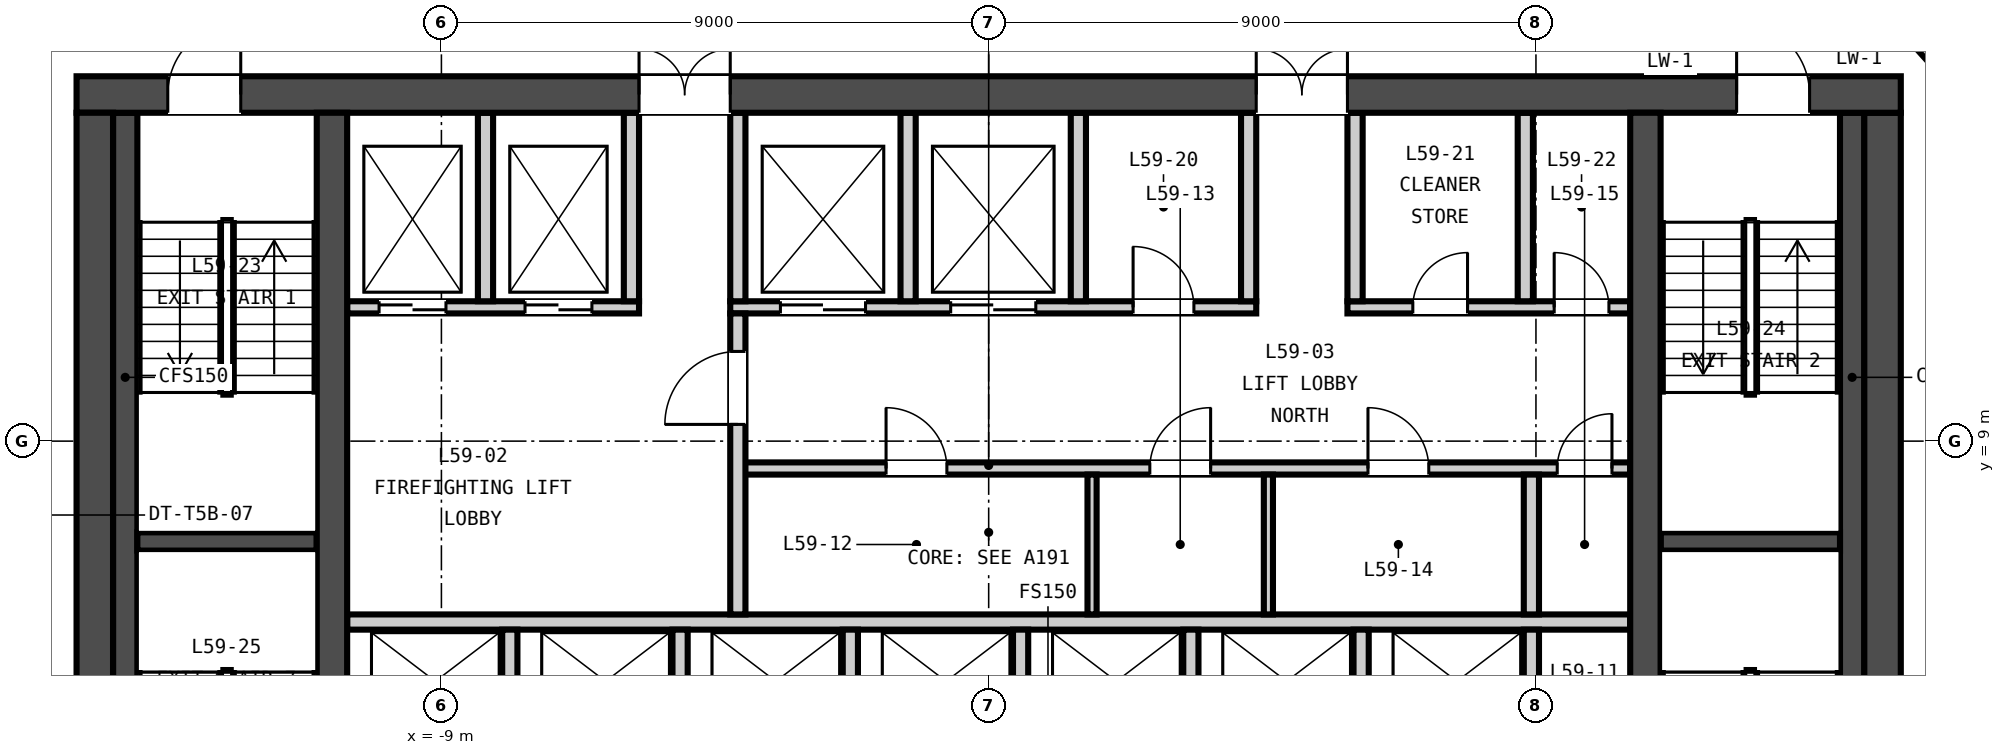
"""IFC4 building model, lengths in metres.
Left out: names, types, materials, properties, quantities, classifications, styles, units other than length and angle.
Written with IfcOpenShell. Run it as: python <this file> out.ifc"""

import sys

from ifc_helpers import new_model, si_unit, direction, frame, frame_2d, origin, place, context, subcontext, project, spatial, rectangle, extrude, element, fill, save


model = new_model("IFC4")
c1 = context("Model", 3, precision=1e-05, world=origin(), true_north=direction((0.0, 1.0)))
c2 = subcontext(c1, "Body", "Model", "MODEL_VIEW")
j1 = project(units=[si_unit("LENGTHUNIT", "METRE"), si_unit("PLANEANGLEUNIT", "RADIAN")], contexts=[c1])
p1 = place(None, origin())
s1 = spatial("IfcSite", under=j1, at=p1, CompositionType="ELEMENT")
p2 = place(p1, origin())
s2 = spatial("IfcBuilding", under=s1, at=p2, CompositionType="ELEMENT")
p3 = place(p2, frame((0.0, 0.0, 234.55)))
s3 = spatial("IfcBuildingStorey", under=s2, at=p3, CompositionType="ELEMENT", Elevation=234.55)
p4 = place(p3, frame((-15.0, 14.7, -0.15), z_axis=(0.0, 0.0, 1.0), x_axis=(1.0, 0.0, 0.0)))
e1 = element("IfcWall", 1, at=p4, inside=s3, PredefinedType="SOLIDWALL", context=c2, shape_type="SweptSolid", body=[
    extrude(rectangle(XDim=30.0, YDim=0.6, at=frame_2d((15.0, 0.0))), origin(), (0.0, 0.0, 1.0), 3.65),
])
p5 = place(p4, frame((9.25, 0.0, 0.15)))
e2 = element("IfcOpeningElement", 2, at=p5, cuts=e1, PredefinedType="OPENING", context=c2, shape_type="SweptSolid", body=[
    extrude(rectangle(XDim=1.5, YDim=2.1, at=frame_2d((0.75, 1.05))), frame((0.0, 0.31, 0.0), z_axis=(0.0, -1.0, 0.0), x_axis=(1.0, 0.0, 0.0)), (0.0, 0.0, 1.0), 0.62),
])
p6 = place(p4, frame((19.4, 0.0, 0.15)))
e3 = element("IfcOpeningElement", 3, at=p6, cuts=e1, PredefinedType="OPENING", context=c2, shape_type="SweptSolid", body=[
    extrude(rectangle(XDim=1.5, YDim=2.1, at=frame_2d((0.75, 1.05))), frame((0.0, 0.31, 0.0), z_axis=(0.0, -1.0, 0.0), x_axis=(1.0, 0.0, 0.0)), (0.0, 0.0, 1.0), 0.62),
])
p7 = place(p4, frame((1.5, 0.0, 0.15)))
e4 = element("IfcOpeningElement", 4, at=p7, cuts=e1, PredefinedType="OPENING", context=c2, shape_type="SweptSolid", body=[
    extrude(rectangle(XDim=1.2, YDim=2.1, at=frame_2d((0.6, 1.05))), frame((0.0, 0.31, 0.0), z_axis=(0.0, -1.0, 0.0), x_axis=(1.0, 0.0, 0.0)), (0.0, 0.0, 1.0), 0.62),
])
p8 = place(p4, frame((27.3, 0.0, 0.15)))
e5 = element("IfcOpeningElement", 5, at=p8, cuts=e1, PredefinedType="OPENING", context=c2, shape_type="SweptSolid", body=[
    extrude(rectangle(XDim=1.2, YDim=2.1, at=frame_2d((0.6, 1.05))), frame((0.0, 0.31, 0.0), z_axis=(0.0, -1.0, 0.0), x_axis=(1.0, 0.0, 0.0)), (0.0, 0.0, 1.0), 0.62),
])
for number, where, z_axis, x_axis in (
    (6, (-14.7, 0.6, -0.15), (0.0, 0.0, 1.0), (0.0, 1.0, 0.0)),
    (7, (14.7, 0.6, -0.15), (0.0, 0.0, 1.0), (0.0, 1.0, 0.0)),
):
    element("IfcWall", number, at=place(p3, frame(where, z_axis=z_axis, x_axis=x_axis)), inside=s3, PredefinedType="SOLIDWALL", context=c2, shape_type="SweptSolid", body=[
        extrude(rectangle(XDim=13.8, YDim=0.6, at=frame_2d((6.9, 0.0))), origin(), (0.0, 0.0, 1.0), 3.65),
    ])
for number, where, z_axis, x_axis in (
    (8, (-10.8, 0.6, -0.15), (0.0, 0.0, 1.0), (0.0, 1.0, 0.0)),
    (9, (10.8, 0.6, -0.15), (0.0, 0.0, 1.0), (0.0, 1.0, 0.0)),
):
    element("IfcWall", number, at=place(p3, frame(where, z_axis=z_axis, x_axis=x_axis)), inside=s3, PredefinedType="SOLIDWALL", context=c2, shape_type="SweptSolid", body=[
        extrude(rectangle(XDim=13.8, YDim=0.5, at=frame_2d((6.9, 0.0))), origin(), (0.0, 0.0, 1.0), 3.65),
    ])
p9 = place(p3, frame((-10.55, 6.025, 0.0), z_axis=(0.0, 0.0, 1.0), x_axis=(1.0, 0.0, 0.0)))
e10 = element("IfcWall", 10, at=p9, inside=s3, PredefinedType="PARTITIONING", context=c2, shape_type="SweptSolid", body=[
    extrude(rectangle(XDim=21.1, YDim=0.25, at=frame_2d((10.55, 0.0))), origin(), (0.0, 0.0, 1.0), 3.5),
])
p10 = place(p3, frame((-4.125, 8.55, 0.0), z_axis=(0.0, 0.0, 1.0), x_axis=(1.0, 0.0, 0.0)))
e11 = element("IfcWall", 11, at=p10, inside=s3, PredefinedType="PARTITIONING", context=c2, shape_type="SweptSolid", body=[
    extrude(rectangle(XDim=14.675, YDim=0.2, at=frame_2d((7.337, 0.0))), origin(), (0.0, 0.0, 1.0), 3.5),
])
p11 = place(p10, frame((2.438, 0.0, 0.0)))
e12 = element("IfcOpeningElement", 12, at=p11, cuts=e11, PredefinedType="OPENING", context=c2, shape_type="SweptSolid", body=[
    extrude(rectangle(XDim=1.0, YDim=2.1, at=frame_2d((0.5, 1.05))), frame((0.0, 0.11, 0.0), z_axis=(0.0, -1.0, 0.0), x_axis=(1.0, 0.0, 0.0)), (0.0, 0.0, 1.0), 0.22),
])
p12 = place(p10, frame((6.775, 0.0, 0.0)))
e13 = element("IfcOpeningElement", 13, at=p12, cuts=e11, PredefinedType="OPENING", context=c2, shape_type="SweptSolid", body=[
    extrude(rectangle(XDim=1.0, YDim=2.1, at=frame_2d((0.5, 1.05))), frame((0.0, 0.11, 0.0), z_axis=(0.0, -1.0, 0.0), x_axis=(1.0, 0.0, 0.0)), (0.0, 0.0, 1.0), 0.22),
])
p13 = place(p10, frame((10.363, 0.0, 0.0)))
e14 = element("IfcOpeningElement", 14, at=p13, cuts=e11, PredefinedType="OPENING", context=c2, shape_type="SweptSolid", body=[
    extrude(rectangle(XDim=1.0, YDim=2.1, at=frame_2d((0.5, 1.05))), frame((0.0, 0.11, 0.0), z_axis=(0.0, -1.0, 0.0), x_axis=(1.0, 0.0, 0.0)), (0.0, 0.0, 1.0), 0.22),
])
p14 = place(p10, frame((13.475, 0.0, 0.0)))
e15 = element("IfcOpeningElement", 15, at=p14, cuts=e11, PredefinedType="OPENING", context=c2, shape_type="SweptSolid", body=[
    extrude(rectangle(XDim=0.9, YDim=2.1, at=frame_2d((0.45, 1.05))), frame((0.0, 0.11, 0.0), z_axis=(0.0, -1.0, 0.0), x_axis=(1.0, 0.0, 0.0)), (0.0, 0.0, 1.0), 0.22),
])
p15 = place(p3, frame((-10.55, 11.2, 0.0), z_axis=(0.0, 0.0, 1.0), x_axis=(1.0, 0.0, 0.0)))
e16 = element("IfcWall", 16, at=p15, inside=s3, PredefinedType="PARTITIONING", context=c2, shape_type="SweptSolid", body=[
    extrude(rectangle(XDim=4.8, YDim=0.2, at=frame_2d((2.4, 0.0))), origin(), (0.0, 0.0, 1.0), 3.5),
])
p16 = place(p15, frame((0.525, 0.0, 0.0)))
e17 = element("IfcOpeningElement", 17, at=p16, cuts=e16, PredefinedType="OPENING", context=c2, shape_type="SweptSolid", body=[
    extrude(rectangle(XDim=1.1, YDim=2.1, at=frame_2d((0.55, 1.05))), frame((0.0, 0.11, 0.0), z_axis=(0.0, -1.0, 0.0), x_axis=(1.0, 0.0, 0.0)), (0.0, 0.0, 1.0), 0.22),
])
p17 = place(p15, frame((2.925, 0.0, 0.0)))
e18 = element("IfcOpeningElement", 18, at=p17, cuts=e16, PredefinedType="OPENING", context=c2, shape_type="SweptSolid", body=[
    extrude(rectangle(XDim=1.1, YDim=2.1, at=frame_2d((0.55, 1.05))), frame((0.0, 0.11, 0.0), z_axis=(0.0, -1.0, 0.0), x_axis=(1.0, 0.0, 0.0)), (0.0, 0.0, 1.0), 0.22),
])
p18 = place(p3, frame((-4.25, 11.2, 0.0), z_axis=(0.0, 0.0, 1.0), x_axis=(1.0, 0.0, 0.0)))
e19 = element("IfcWall", 19, at=p18, inside=s3, PredefinedType="PARTITIONING", context=c2, shape_type="SweptSolid", body=[
    extrude(rectangle(XDim=8.65, YDim=0.2, at=frame_2d((4.325, 0.0))), origin(), (0.0, 0.0, 1.0), 3.5),
])
p19 = place(p18, frame((0.825, 0.0, 0.0)))
e20 = element("IfcOpeningElement", 20, at=p19, cuts=e19, PredefinedType="OPENING", context=c2, shape_type="SweptSolid", body=[
    extrude(rectangle(XDim=1.4, YDim=2.1, at=frame_2d((0.7, 1.05))), frame((0.0, 0.11, 0.0), z_axis=(0.0, -1.0, 0.0), x_axis=(1.0, 0.0, 0.0)), (0.0, 0.0, 1.0), 0.22),
])
p20 = place(p18, frame((3.625, 0.0, 0.0)))
e21 = element("IfcOpeningElement", 21, at=p20, cuts=e19, PredefinedType="OPENING", context=c2, shape_type="SweptSolid", body=[
    extrude(rectangle(XDim=1.4, YDim=2.1, at=frame_2d((0.7, 1.05))), frame((0.0, 0.11, 0.0), z_axis=(0.0, -1.0, 0.0), x_axis=(1.0, 0.0, 0.0)), (0.0, 0.0, 1.0), 0.22),
])
p21 = place(p18, frame((6.625, 0.0, 0.0)))
e22 = element("IfcOpeningElement", 22, at=p21, cuts=e19, PredefinedType="OPENING", context=c2, shape_type="SweptSolid", body=[
    extrude(rectangle(XDim=1.0, YDim=2.1, at=frame_2d((0.5, 1.05))), frame((0.0, 0.11, 0.0), z_axis=(0.0, -1.0, 0.0), x_axis=(1.0, 0.0, 0.0)), (0.0, 0.0, 1.0), 0.22),
])
p22 = place(p3, frame((5.9, 11.2, 0.0), z_axis=(0.0, 0.0, 1.0), x_axis=(1.0, 0.0, 0.0)))
e23 = element("IfcWall", 23, at=p22, inside=s3, PredefinedType="PARTITIONING", context=c2, shape_type="SweptSolid", body=[
    extrude(rectangle(XDim=4.65, YDim=0.2, at=frame_2d((2.325, 0.0))), origin(), (0.0, 0.0, 1.0), 3.5),
])
p23 = place(p22, frame((1.075, 0.0, 0.0)))
e24 = element("IfcOpeningElement", 24, at=p23, cuts=e23, PredefinedType="OPENING", context=c2, shape_type="SweptSolid", body=[
    extrude(rectangle(XDim=0.9, YDim=2.1, at=frame_2d((0.45, 1.05))), frame((0.0, 0.11, 0.0), z_axis=(0.0, -1.0, 0.0), x_axis=(1.0, 0.0, 0.0)), (0.0, 0.0, 1.0), 0.22),
])
p24 = place(p22, frame((3.4, 0.0, 0.0)))
e25 = element("IfcOpeningElement", 25, at=p24, cuts=e23, PredefinedType="OPENING", context=c2, shape_type="SweptSolid", body=[
    extrude(rectangle(XDim=0.9, YDim=2.1, at=frame_2d((0.45, 1.05))), frame((0.0, 0.11, 0.0), z_axis=(0.0, -1.0, 0.0), x_axis=(1.0, 0.0, 0.0)), (0.0, 0.0, 1.0), 0.22),
])
p25 = place(p3, frame((-4.125, 6.15, 0.0), z_axis=(0.0, 0.0, 1.0), x_axis=(0.0, 1.0, 0.0)))
e26 = element("IfcWall", 26, at=p25, inside=s3, PredefinedType="PARTITIONING", context=c2, shape_type="SweptSolid", body=[
    extrude(rectangle(XDim=4.95, YDim=0.25, at=frame_2d((2.475, 0.0))), origin(), (0.0, 0.0, 1.0), 3.5),
])
p26 = place(p25, frame((3.125, 0.0, 0.0)))
e27 = element("IfcOpeningElement", 27, at=p26, cuts=e26, PredefinedType="OPENING", context=c2, shape_type="SweptSolid", body=[
    extrude(rectangle(XDim=1.2, YDim=2.1, at=frame_2d((0.6, 1.05))), frame((0.0, 0.135, 0.0), z_axis=(0.0, -1.0, 0.0), x_axis=(1.0, 0.0, 0.0)), (0.0, 0.0, 1.0), 0.27),
])
for number, where, z_axis, x_axis in (
    (28, (-7.875, 3.6, 0.0), (0.0, 0.0, 1.0), (0.0, 1.0, 0.0)),
    (29, (-5.075, 3.6, 0.0), (0.0, 0.0, 1.0), (0.0, 1.0, 0.0)),
    (30, (-2.275, 3.6, 0.0), (0.0, 0.0, 1.0), (0.0, 1.0, 0.0)),
    (31, (0.525, 3.6, 0.0), (0.0, 0.0, 1.0), (0.0, 1.0, 0.0)),
    (32, (3.325, 3.6, 0.0), (0.0, 0.0, 1.0), (0.0, 1.0, 0.0)),
    (33, (6.125, 3.6, 0.0), (0.0, 0.0, 1.0), (0.0, 1.0, 0.0)),
    (34, (8.925, 3.6, 0.0), (0.0, 0.0, 1.0), (0.0, 1.0, 0.0)),
):
    element("IfcWall", number, at=place(p3, frame(where, z_axis=z_axis, x_axis=x_axis)), inside=s3, PredefinedType="PARTITIONING", context=c2, shape_type="SweptSolid", body=[
        extrude(rectangle(XDim=2.3, YDim=0.25, at=frame_2d((1.15, 0.0))), origin(), (0.0, 0.0, 1.0), 3.5),
    ])
for number, where, z_axis, x_axis in (
    (35, (1.7, 6.15, 0.0), (0.0, 0.0, 1.0), (0.0, 1.0, 0.0)),
    (36, (4.6, 6.15, 0.0), (0.0, 0.0, 1.0), (0.0, 1.0, 0.0)),
):
    element("IfcWall", number, at=place(p3, frame(where, z_axis=z_axis, x_axis=x_axis)), inside=s3, PredefinedType="PARTITIONING", context=c2, shape_type="SweptSolid", body=[
        extrude(rectangle(XDim=2.3, YDim=0.15, at=frame_2d((1.15, 0.0))), origin(), (0.0, 0.0, 1.0), 3.5),
    ])
p27 = place(p3, frame((8.925, 6.15, 0.0), z_axis=(0.0, 0.0, 1.0), x_axis=(0.0, 1.0, 0.0)))
e37 = element("IfcWall", 37, at=p27, inside=s3, PredefinedType="PARTITIONING", context=c2, shape_type="SweptSolid", body=[
    extrude(rectangle(XDim=2.3, YDim=0.25, at=frame_2d((1.15, 0.0))), origin(), (0.0, 0.0, 1.0), 3.5),
])
for number, where, z_axis, x_axis in (
    (38, (-8.275, 11.3, 0.0), (0.0, 0.0, 1.0), (0.0, 1.0, 0.0)),
    (39, (-5.875, 11.3, 0.0), (0.0, 0.0, 1.0), (0.0, 1.0, 0.0)),
    (40, (-4.125, 11.3, 0.0), (0.0, 0.0, 1.0), (0.0, 1.0, 0.0)),
    (41, (-1.325, 11.3, 0.0), (0.0, 0.0, 1.0), (0.0, 1.0, 0.0)),
    (42, (1.475, 11.3, 0.0), (0.0, 0.0, 1.0), (0.0, 1.0, 0.0)),
    (43, (4.275, 11.3, 0.0), (0.0, 0.0, 1.0), (0.0, 1.0, 0.0)),
    (44, (6.025, 11.3, 0.0), (0.0, 0.0, 1.0), (0.0, 1.0, 0.0)),
    (45, (8.825, 11.3, 0.0), (0.0, 0.0, 1.0), (0.0, 1.0, 0.0)),
):
    element("IfcWall", number, at=place(p3, frame(where, z_axis=z_axis, x_axis=x_axis)), inside=s3, PredefinedType="PARTITIONING", context=c2, shape_type="SweptSolid", body=[
        extrude(rectangle(XDim=3.1, YDim=0.25, at=frame_2d((1.55, 0.0))), origin(), (0.0, 0.0, 1.0), 3.5),
    ])
p28 = place(p3, frame((-14.0, 7.35, 0.0), z_axis=(0.0, 0.0, 1.0), x_axis=(1.0, 0.0, 0.0)))
e46 = element("IfcWall", 46, at=p28, inside=s3, PredefinedType="SOLIDWALL", context=c2, shape_type="SweptSolid", body=[
    extrude(rectangle(XDim=2.95, YDim=0.3, at=frame_2d((1.475, 0.0))), origin(), (0.0, 0.0, 1.0), 3.5),
])
p29 = place(p3, frame((-14.2, 0.6, 0.0), z_axis=(0.0, 0.0, 1.0), x_axis=(0.0, 1.0, 0.0)))
e47 = element("IfcWall", 47, at=p29, inside=s3, PredefinedType="SOLIDWALL", context=c2, shape_type="SweptSolid", body=[
    extrude(rectangle(XDim=13.8, YDim=0.4, at=frame_2d((6.9, 0.0))), origin(), (0.0, 0.0, 1.0), 3.5),
])
p30 = place(p3, frame((11.05, 7.35, 0.0), z_axis=(0.0, 0.0, 1.0), x_axis=(1.0, 0.0, 0.0)))
e48 = element("IfcWall", 48, at=p30, inside=s3, PredefinedType="SOLIDWALL", context=c2, shape_type="SweptSolid", body=[
    extrude(rectangle(XDim=2.95, YDim=0.3, at=frame_2d((1.475, 0.0))), origin(), (0.0, 0.0, 1.0), 3.5),
])
p31 = place(p3, frame((14.2, 0.6, 0.0), z_axis=(0.0, 0.0, 1.0), x_axis=(0.0, 1.0, 0.0)))
e49 = element("IfcWall", 49, at=p31, inside=s3, PredefinedType="SOLIDWALL", context=c2, shape_type="SweptSolid", body=[
    extrude(rectangle(XDim=13.8, YDim=0.4, at=frame_2d((6.9, 0.0))), origin(), (0.0, 0.0, 1.0), 3.5),
])
p32 = place(p3, frame((14.476, 16.433, 0.0), z_axis=(0.0, 0.0, 1.0), x_axis=(0.669204384193, -0.743078388985, 0.0)))
e50 = element("IfcWall", 50, at=p32, inside=s3, PredefinedType="PARTITIONING", context=c2, shape_type="SweptSolid", body=[
    extrude(rectangle(XDim=3.996, YDim=0.15, at=frame_2d((1.998, 0.0))), origin(), (0.0, 0.0, 1.0), 2.751),
])
p33 = place(p26, origin())
e51 = element("IfcDoor", 51, at=p33, inside=s3, OperationType="SINGLE_SWING_LEFT", PredefinedType="DOOR", context=c2, shape_type="SweptSolid", body=[
    extrude(rectangle(XDim=1.2, YDim=2.1, at=frame_2d((0.6, 1.05))), frame((0.0, 0.025, 0.0), z_axis=(0.0, -1.0, 0.0), x_axis=(1.0, 0.0, 0.0)), (0.0, 0.0, 1.0), 0.05),
])
fill(e27, e51)
p34 = place(p11, origin())
e52 = element("IfcDoor", 52, at=p34, inside=s3, OperationType="SINGLE_SWING_LEFT", PredefinedType="DOOR", context=c2, shape_type="SweptSolid", body=[
    extrude(rectangle(XDim=1.0, YDim=2.1, at=frame_2d((0.5, 1.05))), frame((0.0, 0.025, 0.0), z_axis=(0.0, -1.0, 0.0), x_axis=(1.0, 0.0, 0.0)), (0.0, 0.0, 1.0), 0.05),
])
fill(e12, e52)
p35 = place(p12, origin())
e53 = element("IfcDoor", 53, at=p35, inside=s3, OperationType="SINGLE_SWING_RIGHT", PredefinedType="DOOR", context=c2, shape_type="SweptSolid", body=[
    extrude(rectangle(XDim=1.0, YDim=2.1, at=frame_2d((0.5, 1.05))), frame((0.0, 0.025, 0.0), z_axis=(0.0, -1.0, 0.0), x_axis=(1.0, 0.0, 0.0)), (0.0, 0.0, 1.0), 0.05),
])
fill(e13, e53)
p36 = place(p13, origin())
e54 = element("IfcDoor", 54, at=p36, inside=s3, OperationType="SINGLE_SWING_LEFT", PredefinedType="DOOR", context=c2, shape_type="SweptSolid", body=[
    extrude(rectangle(XDim=1.0, YDim=2.1, at=frame_2d((0.5, 1.05))), frame((0.0, 0.025, 0.0), z_axis=(0.0, -1.0, 0.0), x_axis=(1.0, 0.0, 0.0)), (0.0, 0.0, 1.0), 0.05),
])
fill(e14, e54)
p37 = place(p14, origin())
e55 = element("IfcDoor", 55, at=p37, inside=s3, OperationType="SINGLE_SWING_RIGHT", PredefinedType="DOOR", context=c2, shape_type="SweptSolid", body=[
    extrude(rectangle(XDim=0.9, YDim=2.1, at=frame_2d((0.45, 1.05))), frame((0.0, 0.025, 0.0), z_axis=(0.0, -1.0, 0.0), x_axis=(1.0, 0.0, 0.0)), (0.0, 0.0, 1.0), 0.05),
])
fill(e15, e55)
p38 = place(p16, origin())
e56 = element("IfcDoor", 56, at=p38, inside=s3, OperationType="DOUBLE_DOOR_SLIDING", PredefinedType="DOOR", context=c2, shape_type="SweptSolid", body=[
    extrude(rectangle(XDim=1.1, YDim=2.1, at=frame_2d((0.55, 1.05))), frame((0.0, 0.025, 0.0), z_axis=(0.0, -1.0, 0.0), x_axis=(1.0, 0.0, 0.0)), (0.0, 0.0, 1.0), 0.05),
])
fill(e17, e56)
p39 = place(p17, origin())
e57 = element("IfcDoor", 57, at=p39, inside=s3, OperationType="DOUBLE_DOOR_SLIDING", PredefinedType="DOOR", context=c2, shape_type="SweptSolid", body=[
    extrude(rectangle(XDim=1.1, YDim=2.1, at=frame_2d((0.55, 1.05))), frame((0.0, 0.025, 0.0), z_axis=(0.0, -1.0, 0.0), x_axis=(1.0, 0.0, 0.0)), (0.0, 0.0, 1.0), 0.05),
])
fill(e18, e57)
p40 = place(p19, origin())
e58 = element("IfcDoor", 58, at=p40, inside=s3, OperationType="DOUBLE_DOOR_SLIDING", PredefinedType="DOOR", context=c2, shape_type="SweptSolid", body=[
    extrude(rectangle(XDim=1.4, YDim=2.1, at=frame_2d((0.7, 1.05))), frame((0.0, 0.025, 0.0), z_axis=(0.0, -1.0, 0.0), x_axis=(1.0, 0.0, 0.0)), (0.0, 0.0, 1.0), 0.05),
])
fill(e20, e58)
p41 = place(p20, origin())
e59 = element("IfcDoor", 59, at=p41, inside=s3, OperationType="DOUBLE_DOOR_SLIDING", PredefinedType="DOOR", context=c2, shape_type="SweptSolid", body=[
    extrude(rectangle(XDim=1.4, YDim=2.1, at=frame_2d((0.7, 1.05))), frame((0.0, 0.025, 0.0), z_axis=(0.0, -1.0, 0.0), x_axis=(1.0, 0.0, 0.0)), (0.0, 0.0, 1.0), 0.05),
])
fill(e21, e59)
p42 = place(p21, origin())
e60 = element("IfcDoor", 60, at=p42, inside=s3, OperationType="SINGLE_SWING_LEFT", PredefinedType="DOOR", context=c2, shape_type="SweptSolid", body=[
    extrude(rectangle(XDim=1.0, YDim=2.1, at=frame_2d((0.5, 1.05))), frame((0.0, 0.025, 0.0), z_axis=(0.0, -1.0, 0.0), x_axis=(1.0, 0.0, 0.0)), (0.0, 0.0, 1.0), 0.05),
])
fill(e22, e60)
p43 = place(p23, origin())
e61 = element("IfcDoor", 61, at=p43, inside=s3, OperationType="SINGLE_SWING_RIGHT", PredefinedType="DOOR", context=c2, shape_type="SweptSolid", body=[
    extrude(rectangle(XDim=0.9, YDim=2.1, at=frame_2d((0.45, 1.05))), frame((0.0, 0.025, 0.0), z_axis=(0.0, -1.0, 0.0), x_axis=(1.0, 0.0, 0.0)), (0.0, 0.0, 1.0), 0.05),
])
fill(e24, e61)
p44 = place(p24, origin())
e62 = element("IfcDoor", 62, at=p44, inside=s3, OperationType="SINGLE_SWING_LEFT", PredefinedType="DOOR", context=c2, shape_type="SweptSolid", body=[
    extrude(rectangle(XDim=0.9, YDim=2.1, at=frame_2d((0.45, 1.05))), frame((0.0, 0.025, 0.0), z_axis=(0.0, -1.0, 0.0), x_axis=(1.0, 0.0, 0.0)), (0.0, 0.0, 1.0), 0.05),
])
fill(e25, e62)
p45 = place(p5, origin())
e63 = element("IfcDoor", 63, at=p45, inside=s3, OperationType="DOUBLE_DOOR_SINGLE_SWING", PredefinedType="DOOR", context=c2, shape_type="SweptSolid", body=[
    extrude(rectangle(XDim=1.5, YDim=2.1, at=frame_2d((0.75, 1.05))), frame((0.0, 0.025, 0.0), z_axis=(0.0, -1.0, 0.0), x_axis=(1.0, 0.0, 0.0)), (0.0, 0.0, 1.0), 0.05),
])
fill(e2, e63)
p46 = place(p6, origin())
e64 = element("IfcDoor", 64, at=p46, inside=s3, OperationType="DOUBLE_DOOR_SINGLE_SWING", PredefinedType="DOOR", context=c2, shape_type="SweptSolid", body=[
    extrude(rectangle(XDim=1.5, YDim=2.1, at=frame_2d((0.75, 1.05))), frame((0.0, 0.025, 0.0), z_axis=(0.0, -1.0, 0.0), x_axis=(1.0, 0.0, 0.0)), (0.0, 0.0, 1.0), 0.05),
])
fill(e3, e64)
p47 = place(p7, origin())
e65 = element("IfcDoor", 65, at=p47, inside=s3, OperationType="SINGLE_SWING_RIGHT", PredefinedType="DOOR", context=c2, shape_type="SweptSolid", body=[
    extrude(rectangle(XDim=1.2, YDim=2.1, at=frame_2d((0.6, 1.05))), frame((0.0, 0.025, 0.0), z_axis=(0.0, -1.0, 0.0), x_axis=(1.0, 0.0, 0.0)), (0.0, 0.0, 1.0), 0.05),
])
fill(e4, e65)
p48 = place(p8, origin())
e66 = element("IfcDoor", 66, at=p48, inside=s3, OperationType="SINGLE_SWING_LEFT", PredefinedType="DOOR", context=c2, shape_type="SweptSolid", body=[
    extrude(rectangle(XDim=1.2, YDim=2.1, at=frame_2d((0.6, 1.05))), frame((0.0, 0.025, 0.0), z_axis=(0.0, -1.0, 0.0), x_axis=(1.0, 0.0, 0.0)), (0.0, 0.0, 1.0), 0.05),
])
fill(e5, e66)
save(model, sys.argv[1])
